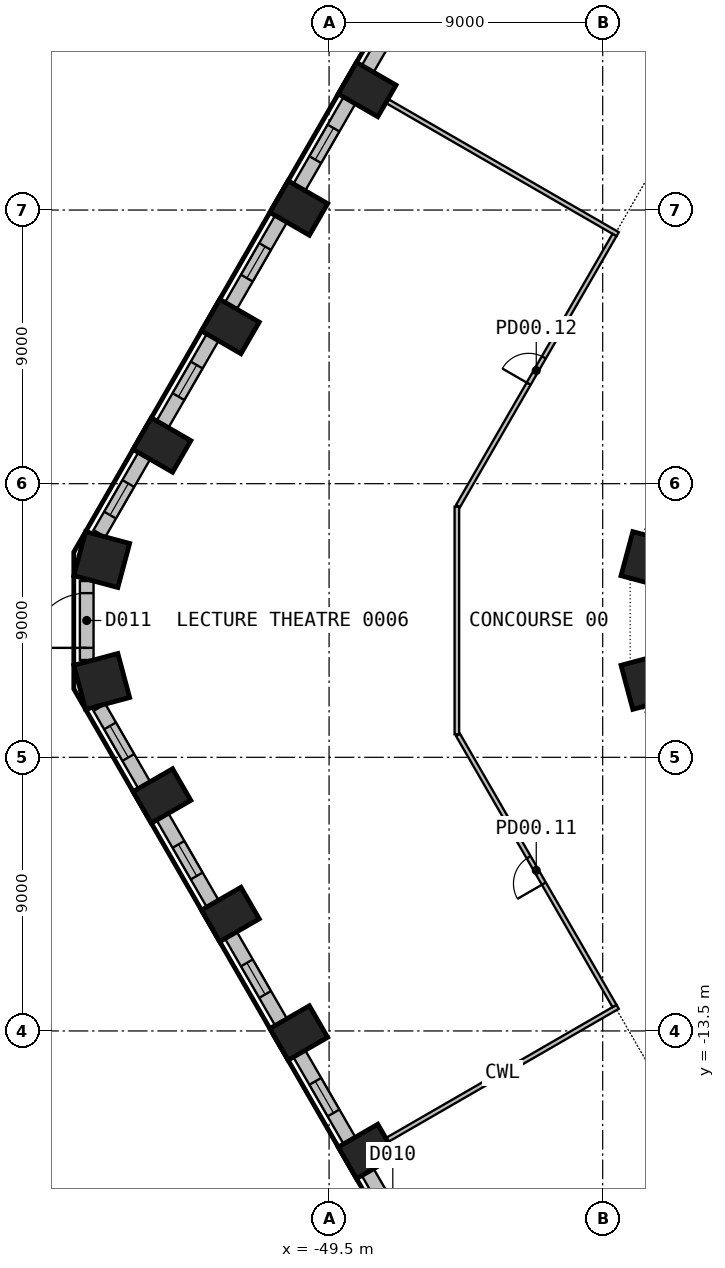
"""IFC4 building model, lengths in metres.
Left out: names, types, materials, properties, quantities, classifications, styles, units other than length and angle.
Written with IfcOpenShell. Run it as: python <this file> out.ifc"""

import sys

from ifc_helpers import new_model, si_unit, direction, frame, frame_2d, origin, origin_2d, place, context, subcontext, project, spatial, rectangle, extrude, element, fill, save


model = new_model("IFC4")
c1 = context("Model", 3, precision=1e-05, world=origin(), true_north=direction((0.0, 1.0)))
c2 = subcontext(c1, "Body", "Model", "MODEL_VIEW")
j1 = project(units=[si_unit("LENGTHUNIT", "METRE"), si_unit("PLANEANGLEUNIT", "RADIAN")], contexts=[c1])
p1 = place(None, origin())
s1 = spatial("IfcSite", under=j1, at=p1, CompositionType="ELEMENT")
p2 = place(p1, origin())
s2 = spatial("IfcBuilding", under=s1, at=p2, CompositionType="ELEMENT")
p3 = place(p2, origin())
s3 = spatial("IfcBuildingStorey", under=s2, at=p3, CompositionType="ELEMENT", Elevation=0.0)
for number, where, z_axis, x_axis in (
    (1, (-48.248, 17.463, 0.0), (0.0, 0.0, 1.0), (-0.5, -0.866, 0.0)),
    (2, (-50.498, 13.566, 0.0), (0.0, 0.0, 1.0), (-0.5, -0.866, 0.0)),
    (3, (-52.748, 9.669, 0.0), (0.0, 0.0, 1.0), (-0.5, -0.866, 0.0)),
    (4, (-54.998, 5.772, 0.0), (0.0, 0.0, 1.0), (-0.5, -0.866, 0.0)),
):
    element("IfcColumn", number, at=place(p3, frame(where, z_axis=z_axis, x_axis=x_axis)), inside=s3, PredefinedType="COLUMN", context=c2, shape_type="SweptSolid", body=[
        extrude(rectangle(XDim=1.2, YDim=1.5, at=origin_2d()), origin(), (0.0, 0.0, 1.0), 6.0),
    ])
for number, where, z_axis, x_axis in (
    (5, (-56.979, 2.004, 0.0), (0.0, 0.0, 1.0), (-0.259, -0.966, 0.0)),
    (6, (-56.979, -2.004, 0.0), (0.0, 0.0, 1.0), (0.259, -0.966, 0.0)),
):
    element("IfcColumn", number, at=place(p3, frame(where, z_axis=z_axis, x_axis=x_axis)), inside=s3, PredefinedType="COLUMN", context=c2, shape_type="SweptSolid", body=[
        extrude(rectangle(XDim=1.5, YDim=1.5, at=origin_2d()), origin(), (0.0, 0.0, 1.0), 6.0),
    ])
for number, where, z_axis, x_axis in (
    (7, (-54.998, -5.772, 0.0), (0.0, 0.0, 1.0), (0.5, -0.866, 0.0)),
    (8, (-52.748, -9.669, 0.0), (0.0, 0.0, 1.0), (0.5, -0.866, 0.0)),
    (9, (-50.498, -13.566, 0.0), (0.0, 0.0, 1.0), (0.5, -0.866, 0.0)),
    (10, (-48.248, -17.463, 0.0), (0.0, 0.0, 1.0), (0.5, -0.866, 0.0)),
):
    element("IfcColumn", number, at=place(p3, frame(where, z_axis=z_axis, x_axis=x_axis)), inside=s3, PredefinedType="COLUMN", context=c2, shape_type="SweptSolid", body=[
        extrude(rectangle(XDim=1.2, YDim=1.5, at=origin_2d()), origin(), (0.0, 0.0, 1.0), 6.0),
    ])
for number, where, z_axis, x_axis in (
    (11, (-38.979, 2.004, 0.0), (0.0, 0.0, 1.0), (-0.259, -0.966, 0.0)),
    (12, (-38.979, -2.004, 0.0), (0.0, 0.0, 1.0), (0.259, -0.966, 0.0)),
):
    element("IfcColumn", number, at=place(p3, frame(where, z_axis=z_axis, x_axis=x_axis)), inside=s3, PredefinedType="COLUMN", context=c2, shape_type="SweptSolid", body=[
        extrude(rectangle(XDim=1.5, YDim=1.5, at=origin_2d()), origin(), (0.0, 0.0, 1.0), 5.6),
    ])
p4 = place(p3, frame((-46.579, 21.003, 0.0), z_axis=(0.0, 0.0, 1.0), x_axis=(-0.499991515992, -0.866030301974, 0.0)))
e13 = element("IfcWall", 13, at=p4, inside=s3, PredefinedType="SOLIDWALL", context=c2, shape_type="SweptSolid", body=[
    extrude(rectangle(XDim=3.299, YDim=0.45, at=frame_2d((1.649, 0.0))), origin(), (0.0, 0.0, 1.0), 6.0),
])
p5 = place(p4, frame((1.05, 0.0, 0.9)))
e14 = element("IfcOpeningElement", 14, at=p5, cuts=e13, PredefinedType="OPENING", context=c2, shape_type="SweptSolid", body=[
    extrude(rectangle(XDim=1.2, YDim=4.2, at=frame_2d((0.6, 2.1))), frame((0.0, 0.235, 0.0), z_axis=(0.0, -1.0, 0.0), x_axis=(1.0, 0.0, 0.0)), (0.0, 0.0, 1.0), 0.47),
])
p6 = place(p3, frame((-48.829, 17.106, 0.0), z_axis=(0.0, 0.0, 1.0), x_axis=(-0.49995947208, -0.866048801325, 0.0)))
e15 = element("IfcWall", 15, at=p6, inside=s3, PredefinedType="SOLIDWALL", context=c2, shape_type="SweptSolid", body=[
    extrude(rectangle(XDim=3.299, YDim=0.45, at=frame_2d((1.649, 0.0))), origin(), (0.0, 0.0, 1.0), 6.0),
])
p7 = place(p6, frame((1.05, 0.0, 0.9)))
e16 = element("IfcOpeningElement", 16, at=p7, cuts=e15, PredefinedType="OPENING", context=c2, shape_type="SweptSolid", body=[
    extrude(rectangle(XDim=1.2, YDim=4.2, at=frame_2d((0.6, 2.1))), frame((0.0, 0.235, 0.0), z_axis=(0.0, -1.0, 0.0), x_axis=(1.0, 0.0, 0.0)), (0.0, 0.0, 1.0), 0.47),
])
p8 = place(p3, frame((-51.079, 13.209, 0.0), z_axis=(0.0, 0.0, 1.0), x_axis=(-0.499991515992, -0.866030301974, 0.0)))
e17 = element("IfcWall", 17, at=p8, inside=s3, PredefinedType="SOLIDWALL", context=c2, shape_type="SweptSolid", body=[
    extrude(rectangle(XDim=3.299, YDim=0.45, at=frame_2d((1.649, 0.0))), origin(), (0.0, 0.0, 1.0), 6.0),
])
p9 = place(p8, frame((1.05, 0.0, 0.9)))
e18 = element("IfcOpeningElement", 18, at=p9, cuts=e17, PredefinedType="OPENING", context=c2, shape_type="SweptSolid", body=[
    extrude(rectangle(XDim=1.2, YDim=4.2, at=frame_2d((0.6, 2.1))), frame((0.0, 0.235, 0.0), z_axis=(0.0, -1.0, 0.0), x_axis=(1.0, 0.0, 0.0)), (0.0, 0.0, 1.0), 0.47),
])
p10 = place(p3, frame((-53.329, 9.312, 0.0), z_axis=(0.0, 0.0, 1.0), x_axis=(-0.49995947208, -0.866048801325, 0.0)))
e19 = element("IfcWall", 19, at=p10, inside=s3, PredefinedType="SOLIDWALL", context=c2, shape_type="SweptSolid", body=[
    extrude(rectangle(XDim=3.299, YDim=0.45, at=frame_2d((1.649, 0.0))), origin(), (0.0, 0.0, 1.0), 6.0),
])
p11 = place(p10, frame((1.05, 0.0, 0.9)))
e20 = element("IfcOpeningElement", 20, at=p11, cuts=e19, PredefinedType="OPENING", context=c2, shape_type="SweptSolid", body=[
    extrude(rectangle(XDim=1.2, YDim=4.2, at=frame_2d((0.6, 2.1))), frame((0.0, 0.235, 0.0), z_axis=(0.0, -1.0, 0.0), x_axis=(1.0, 0.0, 0.0)), (0.0, 0.0, 1.0), 0.47),
])
p12 = place(p3, frame((-55.579, 5.415, 0.0), z_axis=(0.0, 0.0, 1.0), x_axis=(-0.500030648271, -0.866007708274, 0.0)))
e21 = element("IfcWall", 21, at=p12, inside=s3, PredefinedType="SOLIDWALL", context=c2, shape_type="SweptSolid", body=[
    extrude(rectangle(XDim=2.948, YDim=0.45, at=frame_2d((1.474, 0.0))), origin(), (0.0, 0.0, 1.0), 6.0),
])
p13 = place(p12, frame((1.05, 0.0, 0.9)))
e22 = element("IfcOpeningElement", 22, at=p13, cuts=e21, PredefinedType="OPENING", context=c2, shape_type="SweptSolid", body=[
    extrude(rectangle(XDim=1.2, YDim=4.2, at=frame_2d((0.6, 2.1))), frame((0.0, 0.235, 0.0), z_axis=(0.0, -1.0, 0.0), x_axis=(1.0, 0.0, 0.0)), (0.0, 0.0, 1.0), 0.47),
])
p14 = place(p3, frame((-57.472, -1.299, 0.0), z_axis=(0.0, 0.0, 1.0), x_axis=(0.0, 1.0, 0.0)))
e23 = element("IfcWall", 23, at=p14, inside=s3, PredefinedType="SOLIDWALL", context=c2, shape_type="SweptSolid", body=[
    extrude(rectangle(XDim=2.598, YDim=0.45, at=frame_2d((1.299, 0.0))), origin(), (0.0, 0.0, 1.0), 6.0),
])
p15 = place(p14, frame((0.399, 0.0, 0.0)))
e24 = element("IfcOpeningElement", 24, at=p15, cuts=e23, PredefinedType="OPENING", context=c2, shape_type="SweptSolid", body=[
    extrude(rectangle(XDim=1.8, YDim=2.4, at=frame_2d((0.9, 1.2))), frame((0.0, 0.235, 0.0), z_axis=(0.0, -1.0, 0.0), x_axis=(1.0, 0.0, 0.0)), (0.0, 0.0, 1.0), 0.47),
])
p16 = place(p3, frame((-57.054, -2.861, 0.0), z_axis=(0.0, 0.0, 1.0), x_axis=(0.500030648271, -0.866007708274, 0.0)))
e25 = element("IfcWall", 25, at=p16, inside=s3, PredefinedType="SOLIDWALL", context=c2, shape_type="SweptSolid", body=[
    extrude(rectangle(XDim=2.948, YDim=0.45, at=frame_2d((1.474, 0.0))), origin(), (0.0, 0.0, 1.0), 6.0),
])
p17 = place(p16, frame((0.699, 0.0, 0.9)))
e26 = element("IfcOpeningElement", 26, at=p17, cuts=e25, PredefinedType="OPENING", context=c2, shape_type="SweptSolid", body=[
    extrude(rectangle(XDim=1.2, YDim=4.2, at=frame_2d((0.6, 2.1))), frame((0.0, 0.235, 0.0), z_axis=(0.0, -1.0, 0.0), x_axis=(1.0, 0.0, 0.0)), (0.0, 0.0, 1.0), 0.47),
])
p18 = place(p3, frame((-54.979, -6.455, 0.0), z_axis=(0.0, 0.0, 1.0), x_axis=(0.49995947208, -0.866048801325, 0.0)))
e27 = element("IfcWall", 27, at=p18, inside=s3, PredefinedType="SOLIDWALL", context=c2, shape_type="SweptSolid", body=[
    extrude(rectangle(XDim=3.299, YDim=0.45, at=frame_2d((1.649, 0.0))), origin(), (0.0, 0.0, 1.0), 6.0),
])
p19 = place(p18, frame((1.05, 0.0, 0.9)))
e28 = element("IfcOpeningElement", 28, at=p19, cuts=e27, PredefinedType="OPENING", context=c2, shape_type="SweptSolid", body=[
    extrude(rectangle(XDim=1.2, YDim=4.2, at=frame_2d((0.6, 2.1))), frame((0.0, 0.235, 0.0), z_axis=(0.0, -1.0, 0.0), x_axis=(1.0, 0.0, 0.0)), (0.0, 0.0, 1.0), 0.47),
])
p20 = place(p3, frame((-52.729, -10.352, 0.0), z_axis=(0.0, 0.0, 1.0), x_axis=(0.499991515992, -0.866030301974, 0.0)))
e29 = element("IfcWall", 29, at=p20, inside=s3, PredefinedType="SOLIDWALL", context=c2, shape_type="SweptSolid", body=[
    extrude(rectangle(XDim=3.299, YDim=0.45, at=frame_2d((1.649, 0.0))), origin(), (0.0, 0.0, 1.0), 6.0),
])
p21 = place(p20, frame((1.05, 0.0, 0.9)))
e30 = element("IfcOpeningElement", 30, at=p21, cuts=e29, PredefinedType="OPENING", context=c2, shape_type="SweptSolid", body=[
    extrude(rectangle(XDim=1.2, YDim=4.2, at=frame_2d((0.6, 2.1))), frame((0.0, 0.235, 0.0), z_axis=(0.0, -1.0, 0.0), x_axis=(1.0, 0.0, 0.0)), (0.0, 0.0, 1.0), 0.47),
])
p22 = place(p3, frame((-50.479, -14.249, 0.0), z_axis=(0.0, 0.0, 1.0), x_axis=(0.49995947208, -0.866048801325, 0.0)))
e31 = element("IfcWall", 31, at=p22, inside=s3, PredefinedType="SOLIDWALL", context=c2, shape_type="SweptSolid", body=[
    extrude(rectangle(XDim=3.299, YDim=0.45, at=frame_2d((1.649, 0.0))), origin(), (0.0, 0.0, 1.0), 6.0),
])
p23 = place(p22, frame((1.05, 0.0, 0.9)))
e32 = element("IfcOpeningElement", 32, at=p23, cuts=e31, PredefinedType="OPENING", context=c2, shape_type="SweptSolid", body=[
    extrude(rectangle(XDim=1.2, YDim=4.2, at=frame_2d((0.6, 2.1))), frame((0.0, 0.235, 0.0), z_axis=(0.0, -1.0, 0.0), x_axis=(1.0, 0.0, 0.0)), (0.0, 0.0, 1.0), 0.47),
])
p24 = place(p3, frame((-46.579, -21.003, 0.0), z_axis=(0.0, 0.0, 1.0), x_axis=(-0.499991515992, 0.866030301974, 0.0)))
e33 = element("IfcWall", 33, at=p24, inside=s3, PredefinedType="SOLIDWALL", context=c2, shape_type="SweptSolid", body=[
    extrude(rectangle(XDim=3.299, YDim=0.45, at=frame_2d((1.649, 0.0))), origin(), (0.0, 0.0, 1.0), 6.0),
])
p25 = place(p24, frame((0.75, 0.0, 0.0)))
e34 = element("IfcOpeningElement", 34, at=p25, cuts=e33, PredefinedType="OPENING", context=c2, shape_type="SweptSolid", body=[
    extrude(rectangle(XDim=1.8, YDim=2.4, at=frame_2d((0.9, 1.2))), frame((0.0, 0.235, 0.0), z_axis=(0.0, -1.0, 0.0), x_axis=(1.0, 0.0, 0.0)), (0.0, 0.0, 1.0), 0.47),
])
for number, where, z_axis, x_axis in (
    (35, (-47.581, -17.078, 0.0), (0.0, 0.0, 1.0), (0.866, 0.5, 0.0)),
    (36, (-40.009, 12.707, 0.0), (0.0, 0.0, 1.0), (-0.866, 0.5, 0.0)),
):
    element("IfcWall", number, at=place(p3, frame(where, z_axis=z_axis, x_axis=x_axis)), inside=s3, PredefinedType="PARTITIONING", context=c2, shape_type="SweptSolid", body=[
        extrude(rectangle(XDim=8.743, YDim=0.15, at=frame_2d((4.372, 0.0))), origin(), (0.0, 0.0, 1.0), 6.0),
    ])
p26 = place(p3, frame((-45.297, -3.742, 0.0), z_axis=(0.0, 0.0, 1.0), x_axis=(0.0, 1.0, 0.0)))
e37 = element("IfcWall", 37, at=p26, inside=s3, PredefinedType="PARTITIONING", context=c2, shape_type="SweptSolid", body=[
    extrude(rectangle(XDim=7.484, YDim=0.15, at=frame_2d((3.742, 0.0))), origin(), (0.0, 0.0, 1.0), 6.0),
])
p27 = place(p3, frame((-40.112, -12.679, 0.0), z_axis=(0.0, 0.0, 1.0), x_axis=(-0.499979704663, 0.866037120986, 0.0)))
e38 = element("IfcWall", 38, at=p27, inside=s3, PredefinedType="PARTITIONING", context=c2, shape_type="SweptSolid", body=[
    extrude(rectangle(XDim=10.296, YDim=0.15, at=frame_2d((5.148, 0.0))), origin(), (0.0, 0.0, 1.0), 6.0),
])
p28 = place(p27, frame((4.648, 0.0, 0.0)))
e39 = element("IfcOpeningElement", 39, at=p28, cuts=e38, PredefinedType="OPENING", context=c2, shape_type="SweptSolid", body=[
    extrude(rectangle(XDim=1.0, YDim=2.1, at=frame_2d((0.5, 1.05))), frame((0.0, 0.085, 0.0), z_axis=(0.0, -1.0, 0.0), x_axis=(1.0, 0.0, 0.0)), (0.0, 0.0, 1.0), 0.17),
])
p29 = place(p3, frame((-45.26, 3.762, 0.0), z_axis=(0.0, 0.0, 1.0), x_axis=(0.499979704663, 0.866037120986, 0.0)))
e40 = element("IfcWall", 40, at=p29, inside=s3, PredefinedType="PARTITIONING", context=c2, shape_type="SweptSolid", body=[
    extrude(rectangle(XDim=10.296, YDim=0.15, at=frame_2d((5.148, 0.0))), origin(), (0.0, 0.0, 1.0), 6.0),
])
p30 = place(p29, frame((4.648, 0.0, 0.0)))
e41 = element("IfcOpeningElement", 41, at=p30, cuts=e40, PredefinedType="OPENING", context=c2, shape_type="SweptSolid", body=[
    extrude(rectangle(XDim=1.0, YDim=2.1, at=frame_2d((0.5, 1.05))), frame((0.0, 0.085, 0.0), z_axis=(0.0, -1.0, 0.0), x_axis=(1.0, 0.0, 0.0)), (0.0, 0.0, 1.0), 0.17),
])
p31 = place(p7, origin())
e42 = element("IfcWindow", 42, at=p31, inside=s3, PartitioningType="SINGLE_PANEL", PredefinedType="WINDOW", context=c2, shape_type="SweptSolid", body=[
    extrude(rectangle(XDim=1.2, YDim=4.2, at=frame_2d((0.6, 2.1))), frame((0.0, 0.03, 0.0), z_axis=(0.0, -1.0, 0.0), x_axis=(1.0, 0.0, 0.0)), (0.0, 0.0, 1.0), 0.06),
])
fill(e16, e42)
p32 = place(p9, origin())
e43 = element("IfcWindow", 43, at=p32, inside=s3, PartitioningType="SINGLE_PANEL", PredefinedType="WINDOW", context=c2, shape_type="SweptSolid", body=[
    extrude(rectangle(XDim=1.2, YDim=4.2, at=frame_2d((0.6, 2.1))), frame((0.0, 0.03, 0.0), z_axis=(0.0, -1.0, 0.0), x_axis=(1.0, 0.0, 0.0)), (0.0, 0.0, 1.0), 0.06),
])
fill(e18, e43)
p33 = place(p11, origin())
e44 = element("IfcWindow", 44, at=p33, inside=s3, PartitioningType="SINGLE_PANEL", PredefinedType="WINDOW", context=c2, shape_type="SweptSolid", body=[
    extrude(rectangle(XDim=1.2, YDim=4.2, at=frame_2d((0.6, 2.1))), frame((0.0, 0.03, 0.0), z_axis=(0.0, -1.0, 0.0), x_axis=(1.0, 0.0, 0.0)), (0.0, 0.0, 1.0), 0.06),
])
fill(e20, e44)
p34 = place(p13, origin())
e45 = element("IfcWindow", 45, at=p34, inside=s3, PartitioningType="SINGLE_PANEL", PredefinedType="WINDOW", context=c2, shape_type="SweptSolid", body=[
    extrude(rectangle(XDim=1.2, YDim=4.2, at=frame_2d((0.6, 2.1))), frame((0.0, 0.03, 0.0), z_axis=(0.0, -1.0, 0.0), x_axis=(1.0, 0.0, 0.0)), (0.0, 0.0, 1.0), 0.06),
])
fill(e22, e45)
p35 = place(p15, origin())
e46 = element("IfcDoor", 46, at=p35, inside=s3, OperationType="DOUBLE_DOOR_SINGLE_SWING", PredefinedType="DOOR", context=c2, shape_type="SweptSolid", body=[
    extrude(rectangle(XDim=1.8, YDim=2.4, at=frame_2d((0.9, 1.2))), frame((0.0, 0.025, 0.0), z_axis=(0.0, -1.0, 0.0), x_axis=(1.0, 0.0, 0.0)), (0.0, 0.0, 1.0), 0.05),
])
fill(e24, e46)
p36 = place(p17, origin())
e47 = element("IfcWindow", 47, at=p36, inside=s3, PartitioningType="SINGLE_PANEL", PredefinedType="WINDOW", context=c2, shape_type="SweptSolid", body=[
    extrude(rectangle(XDim=1.2, YDim=4.2, at=frame_2d((0.6, 2.1))), frame((0.0, 0.03, 0.0), z_axis=(0.0, -1.0, 0.0), x_axis=(1.0, 0.0, 0.0)), (0.0, 0.0, 1.0), 0.06),
])
fill(e26, e47)
p37 = place(p19, origin())
e48 = element("IfcWindow", 48, at=p37, inside=s3, PartitioningType="SINGLE_PANEL", PredefinedType="WINDOW", context=c2, shape_type="SweptSolid", body=[
    extrude(rectangle(XDim=1.2, YDim=4.2, at=frame_2d((0.6, 2.1))), frame((0.0, 0.03, 0.0), z_axis=(0.0, -1.0, 0.0), x_axis=(1.0, 0.0, 0.0)), (0.0, 0.0, 1.0), 0.06),
])
fill(e28, e48)
p38 = place(p21, origin())
e49 = element("IfcWindow", 49, at=p38, inside=s3, PartitioningType="SINGLE_PANEL", PredefinedType="WINDOW", context=c2, shape_type="SweptSolid", body=[
    extrude(rectangle(XDim=1.2, YDim=4.2, at=frame_2d((0.6, 2.1))), frame((0.0, 0.03, 0.0), z_axis=(0.0, -1.0, 0.0), x_axis=(1.0, 0.0, 0.0)), (0.0, 0.0, 1.0), 0.06),
])
fill(e30, e49)
p39 = place(p23, origin())
e50 = element("IfcWindow", 50, at=p39, inside=s3, PartitioningType="SINGLE_PANEL", PredefinedType="WINDOW", context=c2, shape_type="SweptSolid", body=[
    extrude(rectangle(XDim=1.2, YDim=4.2, at=frame_2d((0.6, 2.1))), frame((0.0, 0.03, 0.0), z_axis=(0.0, -1.0, 0.0), x_axis=(1.0, 0.0, 0.0)), (0.0, 0.0, 1.0), 0.06),
])
fill(e32, e50)
p40 = place(p28, origin())
e51 = element("IfcDoor", 51, at=p40, inside=s3, OperationType="SINGLE_SWING_LEFT", PredefinedType="DOOR", context=c2, shape_type="SweptSolid", body=[
    extrude(rectangle(XDim=1.0, YDim=2.1, at=frame_2d((0.5, 1.05))), frame((0.0, 0.025, 0.0), z_axis=(0.0, -1.0, 0.0), x_axis=(1.0, 0.0, 0.0)), (0.0, 0.0, 1.0), 0.05),
])
fill(e39, e51)
p41 = place(p30, origin())
e52 = element("IfcDoor", 52, at=p41, inside=s3, OperationType="SINGLE_SWING_RIGHT", PredefinedType="DOOR", context=c2, shape_type="SweptSolid", body=[
    extrude(rectangle(XDim=1.0, YDim=2.1, at=frame_2d((0.5, 1.05))), frame((0.0, 0.025, 0.0), z_axis=(0.0, -1.0, 0.0), x_axis=(1.0, 0.0, 0.0)), (0.0, 0.0, 1.0), 0.05),
])
fill(e41, e52)
save(model, sys.argv[1])
